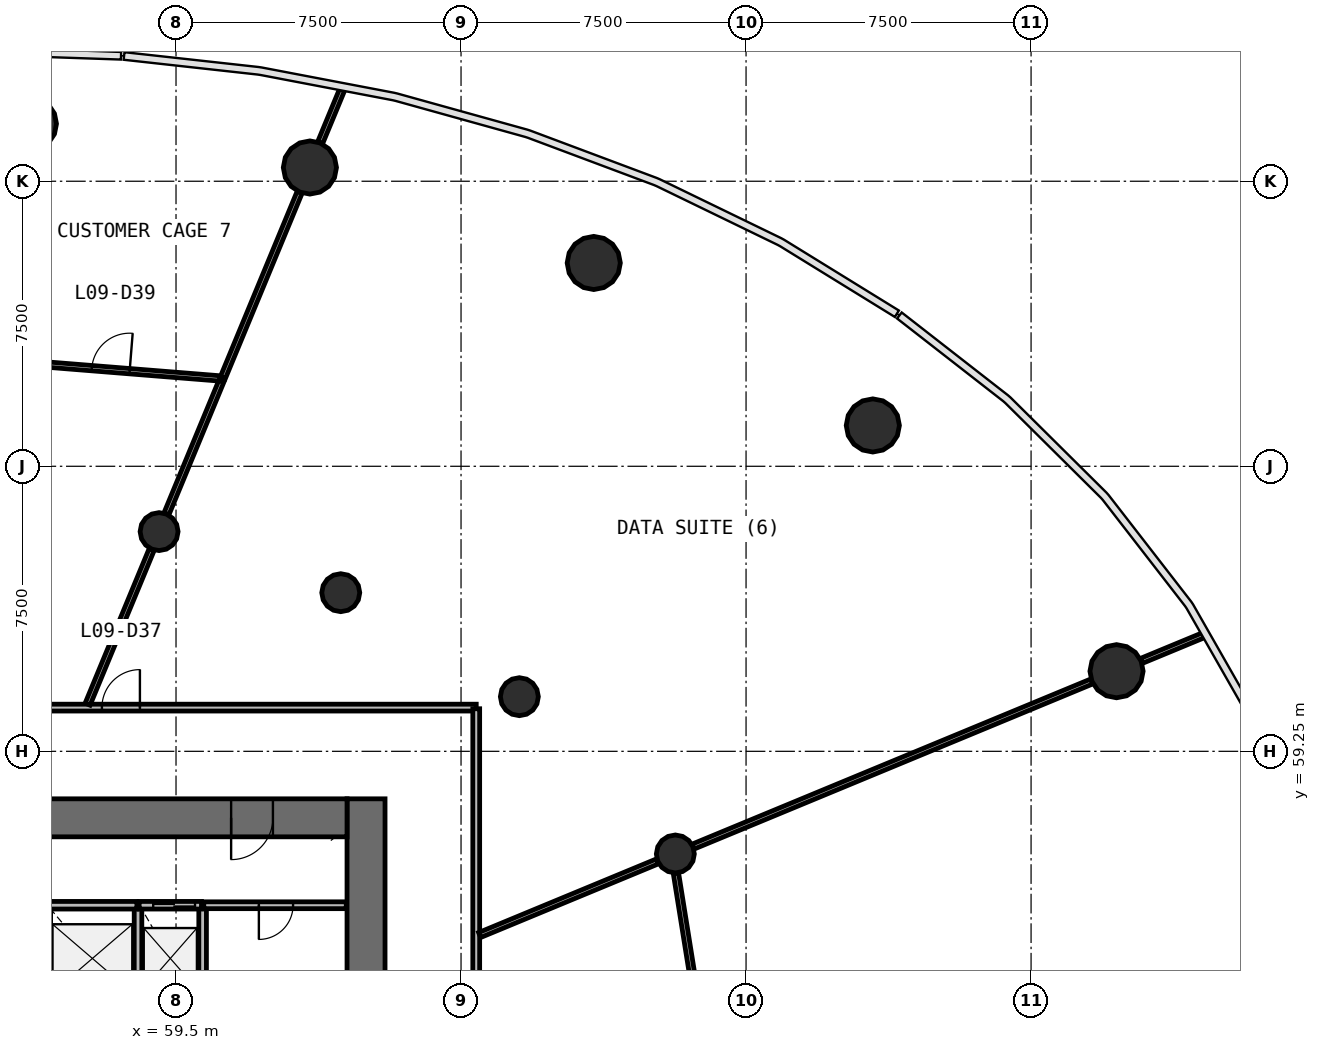
"""IFC4 building model, lengths in metres.
Left out: names, types, materials, properties, quantities, classifications, styles, units other than length and angle.
Written with IfcOpenShell. Run it as: python <this file> out.ifc"""

import sys

from ifc_helpers import new_model, si_unit, direction, frame, frame_2d, origin, origin_2d, place, context, subcontext, project, spatial, rectangle, circle, extrude, source, transform, mapped, element, fill, save


model = new_model("IFC4")
c1 = context("Model", 3, precision=1e-05, world=origin(), true_north=direction((0.0, 1.0)))
c2 = subcontext(c1, "Body", "Model", "MODEL_VIEW")
j1 = project(units=[si_unit("LENGTHUNIT", "METRE"), si_unit("PLANEANGLEUNIT", "RADIAN")], contexts=[c1])
p1 = place(None, origin())
s1 = spatial("IfcSite", under=j1, at=p1, CompositionType="ELEMENT")
p2 = place(p1, origin())
s2 = spatial("IfcBuilding", under=s1, at=p2, CompositionType="ELEMENT")
p3 = place(p2, frame((0.0, 0.0, 40.2)))
s3 = spatial("IfcBuildingStorey", under=s2, at=p3, CompositionType="ELEMENT", Elevation=40.2)
p4 = place(p3, frame((64.5, 38.0, 0.0), z_axis=(0.0, 0.0, 1.0), x_axis=(0.0, 1.0, 0.0)))
e1 = element("IfcWall", 1, at=p4, inside=s3, PredefinedType="SHEAR", context=c2, shape_type="SweptSolid", body=[
    extrude(rectangle(XDim=20.0, YDim=1.0, at=frame_2d((10.0, 0.0))), origin(), (0.0, 0.0, 1.0), 4.4),
])
p5 = place(p4, frame((9.1, 0.0, 0.0)))
e2 = element("IfcOpeningElement", 2, at=p5, cuts=e1, PredefinedType="OPENING", context=c2, shape_type="SweptSolid", body=[
    extrude(rectangle(XDim=1.8, YDim=2.1, at=frame_2d((0.9, 1.05))), frame((0.0, 0.51, 0.0), z_axis=(0.0, -1.0, 0.0), x_axis=(1.0, 0.0, 0.0)), (0.0, 0.0, 1.0), 1.02),
])
p6 = place(p3, frame((64.0, 57.5, 0.0), z_axis=(0.0, 0.0, 1.0), x_axis=(-1.0, 0.0, 0.0)))
e3 = element("IfcWall", 3, at=p6, inside=s3, PredefinedType="SHEAR", context=c2, shape_type="SweptSolid", body=[
    extrude(rectangle(XDim=24.0, YDim=1.0, at=frame_2d((12.0, 0.0))), origin(), (0.0, 0.0, 1.0), 4.4),
])
p7 = place(p6, frame((21.45, 0.0, 0.0)))
e4 = element("IfcOpeningElement", 4, at=p7, cuts=e3, PredefinedType="OPENING", context=c2, shape_type="SweptSolid", body=[
    extrude(rectangle(XDim=1.1, YDim=2.1, at=frame_2d((0.55, 1.05))), frame((0.0, 0.51, 0.0), z_axis=(0.0, -1.0, 0.0), x_axis=(1.0, 0.0, 0.0)), (0.0, 0.0, 1.0), 1.02),
])
p8 = place(p6, frame((1.95, 0.0, 0.0)))
e5 = element("IfcOpeningElement", 5, at=p8, cuts=e3, PredefinedType="OPENING", context=c2, shape_type="SweptSolid", body=[
    extrude(rectangle(XDim=1.1, YDim=2.1, at=frame_2d((0.55, 1.05))), frame((0.0, 0.51, 0.0), z_axis=(0.0, -1.0, 0.0), x_axis=(1.0, 0.0, 0.0)), (0.0, 0.0, 1.0), 1.02),
])
m1 = source(origin(), c2, "Body", "SweptSolid", [
    extrude(circle(Radius=0.7, at=origin_2d()), origin(), (0.0, 0.0, 1.0), 4.4),
])
for number, where, z_axis, x_axis in (
    (6, (84.249, 61.358, 0.0), (0.0, 0.0, 1.0), (1.0, 0.0, 0.0)),
    (7, (77.836, 67.824, 0.0), (0.0, 0.0, 1.0), (1.0, 0.0, 0.0)),
    (8, (70.492, 72.1, 0.0), (0.0, 0.0, 1.0), (1.0, 0.0, 0.0)),
    (9, (63.023, 74.611, 0.0), (0.0, 0.0, 1.0), (1.0, 0.0, 0.0)),
    (10, (55.655, 75.761, 0.0), (0.0, 0.0, 1.0), (1.0, 0.0, 0.0)),
):
    element("IfcColumn", number, at=place(p3, frame(where, z_axis=z_axis, x_axis=x_axis)), inside=s3, PredefinedType="COLUMN", context=c2, shape_type="MappedRepresentation", body=[
        mapped(m1, transform((0.0, 0.0, 0.0), scale=1.0)),
    ])
m2 = source(origin(), c2, "Body", "SweptSolid", [
    extrude(circle(Radius=0.5, at=origin_2d()), origin(), (0.0, 0.0, 1.0), 4.4),
])
for number, where, z_axis, x_axis in (
    (11, (72.639, 56.549, 0.0), (0.0, 0.0, 1.0), (1.0, 0.0, 0.0)),
    (12, (68.535, 60.688, 0.0), (0.0, 0.0, 1.0), (1.0, 0.0, 0.0)),
    (13, (63.835, 63.424, 0.0), (0.0, 0.0, 1.0), (1.0, 0.0, 0.0)),
    (14, (59.055, 65.031, 0.0), (0.0, 0.0, 1.0), (1.0, 0.0, 0.0)),
):
    element("IfcColumn", number, at=place(p3, frame(where, z_axis=z_axis, x_axis=x_axis)), inside=s3, PredefinedType="COLUMN", context=c2, shape_type="MappedRepresentation", body=[
        mapped(m2, transform((0.0, 0.0, 0.0), scale=1.0)),
    ])
for number, where, z_axis, x_axis in (
    (15, (58.5, 52.4, 0.0), (0.0, 0.0, 1.0), (0.0, 1.0, 0.0)),
    (16, (60.2, 52.4, 0.0), (0.0, 0.0, 1.0), (0.0, 1.0, 0.0)),
):
    element("IfcWall", number, at=place(p3, frame(where, z_axis=z_axis, x_axis=x_axis)), inside=s3, PredefinedType="SOLIDWALL", context=c2, shape_type="SweptSolid", body=[
        extrude(rectangle(XDim=2.8, YDim=0.2, at=frame_2d((1.4, 0.0))), origin(), (0.0, 0.0, 1.0), 3.95),
    ])
p9 = place(p3, frame((58.47, 55.2, 0.0), z_axis=(0.0, 0.0, 1.0), x_axis=(-1.0, 0.0, 0.0)))
e17 = element("IfcWall", 17, at=p9, inside=s3, PredefinedType="SOLIDWALL", context=c2, shape_type="SweptSolid", body=[
    extrude(rectangle(XDim=2.34, YDim=0.2, at=frame_2d((1.17, 0.0))), origin(), (0.0, 0.0, 1.0), 3.95),
])
p10 = place(p3, frame((60.17, 55.2, 0.0), z_axis=(0.0, 0.0, 1.0), x_axis=(-1.0, 0.0, 0.0)))
e18 = element("IfcWall", 18, at=p10, inside=s3, PredefinedType="SOLIDWALL", context=c2, shape_type="SweptSolid", body=[
    extrude(rectangle(XDim=1.64, YDim=0.2, at=frame_2d((0.82, 0.0))), origin(), (0.0, 0.0, 1.0), 3.95),
])
p11 = place(p10, frame((0.17, 0.0, 0.0)))
e19 = element("IfcOpeningElement", 19, at=p11, cuts=e18, PredefinedType="OPENING", context=c2, shape_type="SweptSolid", body=[
    extrude(rectangle(XDim=1.1, YDim=2.1, at=frame_2d((0.55, 1.05))), frame((0.0, 0.11, 0.0), z_axis=(0.0, -1.0, 0.0), x_axis=(1.0, 0.0, 0.0)), (0.0, 0.0, 1.0), 0.22),
])
p12 = place(p3, frame((36.6, 60.4, 0.0), z_axis=(0.0, 0.0, 1.0), x_axis=(1.0, 0.0, 0.0)))
e20 = element("IfcWall", 20, at=p12, inside=s3, PredefinedType="PARTITIONING", context=c2, shape_type="SweptSolid", body=[
    extrude(rectangle(XDim=30.8, YDim=0.18, at=frame_2d((15.4, 0.0))), origin(), (0.0, 0.0, 1.0), 3.05),
])
p13 = place(p12, frame((20.95, 0.0, 0.0)))
e21 = element("IfcOpeningElement", 21, at=p13, cuts=e20, PredefinedType="OPENING", context=c2, shape_type="SweptSolid", body=[
    extrude(rectangle(XDim=1.0, YDim=2.1, at=frame_2d((0.5, 1.05))), frame((0.0, 0.1, 0.0), z_axis=(0.0, -1.0, 0.0), x_axis=(1.0, 0.0, 0.0)), (0.0, 0.0, 1.0), 0.2),
])
p14 = place(p12, frame((14.95, 0.0, 0.0)))
e22 = element("IfcOpeningElement", 22, at=p14, cuts=e20, PredefinedType="OPENING", context=c2, shape_type="SweptSolid", body=[
    extrude(rectangle(XDim=1.0, YDim=2.1, at=frame_2d((0.5, 1.05))), frame((0.0, 0.1, 0.0), z_axis=(0.0, -1.0, 0.0), x_axis=(1.0, 0.0, 0.0)), (0.0, 0.0, 1.0), 0.2),
])
p15 = place(p12, frame((8.95, 0.0, 0.0)))
e23 = element("IfcOpeningElement", 23, at=p15, cuts=e20, PredefinedType="OPENING", context=c2, shape_type="SweptSolid", body=[
    extrude(rectangle(XDim=1.0, YDim=2.1, at=frame_2d((0.5, 1.05))), frame((0.0, 0.1, 0.0), z_axis=(0.0, -1.0, 0.0), x_axis=(1.0, 0.0, 0.0)), (0.0, 0.0, 1.0), 0.2),
])
p16 = place(p3, frame((67.4, 60.37, 0.0), z_axis=(0.0, 0.0, 1.0), x_axis=(0.0, -1.0, 0.0)))
e24 = element("IfcWall", 24, at=p16, inside=s3, PredefinedType="PARTITIONING", context=c2, shape_type="SweptSolid", body=[
    extrude(rectangle(XDim=23.583, YDim=0.18, at=frame_2d((11.791, 0.0))), origin(), (0.0, 0.0, 1.0), 3.05),
])
p17 = place(p16, frame((11.333, 0.0, 0.0)))
e25 = element("IfcOpeningElement", 25, at=p17, cuts=e24, PredefinedType="OPENING", context=c2, shape_type="SweptSolid", body=[
    extrude(rectangle(XDim=1.0, YDim=2.1, at=frame_2d((0.5, 1.05))), frame((0.0, 0.1, 0.0), z_axis=(0.0, -1.0, 0.0), x_axis=(1.0, 0.0, 0.0)), (0.0, 0.0, 1.0), 0.2),
])
p18 = place(p3, frame((63.98, 55.2, 0.0), z_axis=(0.0, 0.0, 1.0), x_axis=(-1.0, 0.0, 0.0)))
e26 = element("IfcWall", 26, at=p18, inside=s3, PredefinedType="PARTITIONING", context=c2, shape_type="SweptSolid", body=[
    extrude(rectangle(XDim=3.75, YDim=0.18, at=frame_2d((1.875, 0.0))), origin(), (0.0, 0.0, 1.0), 3.95),
])
p19 = place(p18, frame((1.4, 0.0, 0.0)))
e27 = element("IfcOpeningElement", 27, at=p19, cuts=e26, PredefinedType="OPENING", context=c2, shape_type="SweptSolid", body=[
    extrude(rectangle(XDim=0.9, YDim=2.1, at=frame_2d((0.45, 1.05))), frame((0.0, 0.1, 0.0), z_axis=(0.0, -1.0, 0.0), x_axis=(1.0, 0.0, 0.0)), (0.0, 0.0, 1.0), 0.2),
])
p20 = place(p3, frame((73.106, 56.742, 0.0), z_axis=(0.0, 0.0, 1.0), x_axis=(0.923875075531, 0.382694192291, 0.0)))
e28 = element("IfcWall", 28, at=p20, inside=s3, PredefinedType="PARTITIONING", context=c2, shape_type="SweptSolid", body=[
    extrude(rectangle(XDim=11.356, YDim=0.14, at=frame_2d((5.678, 0.0))), origin(), (0.0, 0.0, 1.0), 3.05),
])
p21 = place(p3, frame((54.834, 69.529, 0.0), z_axis=(0.0, 0.0, 1.0), x_axis=(0.996792896181, -0.080024509517, 0.0)))
e29 = element("IfcWall", 29, at=p21, inside=s3, PredefinedType="PARTITIONING", context=c2, shape_type="SweptSolid", body=[
    extrude(rectangle(XDim=5.906, YDim=0.14, at=frame_2d((2.953, 0.0))), origin(), (0.0, 0.0, 1.0), 3.05),
])
p22 = place(p21, frame((2.456, 0.0, 0.0)))
e30 = element("IfcOpeningElement", 30, at=p22, cuts=e29, PredefinedType="OPENING", context=c2, shape_type="SweptSolid", body=[
    extrude(rectangle(XDim=1.0, YDim=2.1, at=frame_2d((0.5, 1.05))), frame((0.0, 0.08, 0.0), z_axis=(0.0, -1.0, 0.0), x_axis=(1.0, 0.0, 0.0)), (0.0, 0.0, 1.0), 0.16),
])
p23 = place(p3, frame((60.733, 69.084, 0.0), z_axis=(0.0, 0.0, 1.0), x_axis=(0.382663625013, 0.923887736736, 0.0)))
e31 = element("IfcWall", 31, at=p23, inside=s3, PredefinedType="PARTITIONING", context=c2, shape_type="SweptSolid", body=[
    extrude(rectangle(XDim=5.278, YDim=0.14, at=frame_2d((2.639, 0.0))), origin(), (0.0, 0.0, 1.0), 3.05),
])
p24 = place(p3, frame((73.486, 50.859, 0.0), z_axis=(0.0, 0.0, 1.0), x_axis=(-0.158320440448, 0.987387785086, 0.0)))
e32 = element("IfcWall", 32, at=p24, inside=s3, PredefinedType="PARTITIONING", context=c2, shape_type="SweptSolid", body=[
    extrude(rectangle(XDim=5.252, YDim=0.14, at=frame_2d((2.626, 0.0))), origin(), (0.0, 0.0, 1.0), 3.05),
])
p25 = place(p3, frame((67.49, 54.416, 0.0), z_axis=(0.0, 0.0, 1.0), x_axis=(0.923890025086, 0.382658100067, 0.0)))
e33 = element("IfcWall", 33, at=p25, inside=s3, PredefinedType="PARTITIONING", context=c2, shape_type="SweptSolid", body=[
    extrude(rectangle(XDim=5.068, YDim=0.14, at=frame_2d((2.534, 0.0))), origin(), (0.0, 0.0, 1.0), 3.05),
])
p26 = place(p3, frame((57.174, 60.49, 0.0), z_axis=(0.0, 0.0, 1.0), x_axis=(0.382672831764, 0.923883923353, 0.0)))
e34 = element("IfcWall", 34, at=p26, inside=s3, PredefinedType="PARTITIONING", context=c2, shape_type="SweptSolid", body=[
    extrude(rectangle(XDim=4.41, YDim=0.14, at=frame_2d((2.205, 0.0))), origin(), (0.0, 0.0, 1.0), 3.05),
])
p27 = place(p3, frame((59.248, 65.498, 0.0), z_axis=(0.0, 0.0, 1.0), x_axis=(0.382705657047, 0.923870326434, 0.0)))
e35 = element("IfcWall", 35, at=p27, inside=s3, PredefinedType="PARTITIONING", context=c2, shape_type="SweptSolid", body=[
    extrude(rectangle(XDim=3.778, YDim=0.14, at=frame_2d((1.889, 0.0))), origin(), (0.0, 0.0, 1.0), 3.05),
])
p28 = place(p3, frame((84.9, 61.628, 0.0), z_axis=(0.0, 0.0, 1.0), x_axis=(0.92390604877, 0.382619410179, 0.0)))
e36 = element("IfcWall", 36, at=p28, inside=s3, PredefinedType="PARTITIONING", context=c2, shape_type="SweptSolid", body=[
    extrude(rectangle(XDim=1.772, YDim=0.14, at=frame_2d((0.886, 0.0))), origin(), (0.0, 0.0, 1.0), 3.05),
])
p29 = place(p3, frame((63.292, 75.263, 0.0), z_axis=(0.0, 0.0, 1.0), x_axis=(0.382746232653, 0.92385351728, 0.0)))
e37 = element("IfcWall", 37, at=p29, inside=s3, PredefinedType="PARTITIONING", context=c2, shape_type="SweptSolid", body=[
    extrude(rectangle(XDim=1.512, YDim=0.14, at=frame_2d((0.756, 0.0))), origin(), (0.0, 0.0, 1.0), 3.05),
])
m3 = source(origin(), c2, "Body", "SweptSolid", [
    extrude(rectangle(XDim=1.1, YDim=2.1, at=frame_2d((0.55, 1.05))), frame((0.0, 0.025, 0.0), z_axis=(0.0, -1.0, 0.0), x_axis=(1.0, 0.0, 0.0)), (0.0, 0.0, 1.0), 0.05),
])
p30 = place(p11, origin())
e38 = element("IfcDoor", 38, at=p30, inside=s3, OperationType="DOUBLE_DOOR_SLIDING", PredefinedType="USERDEFINED", context=c2, shape_type="MappedRepresentation", body=[
    mapped(m3, transform((0.0, 0.0, 0.0), scale=1.0)),
])
fill(e19, e38)
m4 = source(origin(), c2, "Body", "SweptSolid", [
    extrude(rectangle(XDim=1.1, YDim=2.1, at=frame_2d((0.55, 1.05))), frame((0.0, 0.025, 0.0), z_axis=(0.0, -1.0, 0.0), x_axis=(1.0, 0.0, 0.0)), (0.0, 0.0, 1.0), 0.05),
])
p31 = place(p8, origin())
e39 = element("IfcDoor", 39, at=p31, inside=s3, OperationType="SINGLE_SWING_RIGHT", PredefinedType="DOOR", context=c2, shape_type="MappedRepresentation", body=[
    mapped(m4, transform((0.0, 0.0, 0.0), scale=1.0)),
])
fill(e5, e39)
m5 = source(origin(), c2, "Body", "SweptSolid", [
    extrude(rectangle(XDim=1.0, YDim=2.1, at=frame_2d((0.5, 1.05))), frame((0.0, 0.025, 0.0), z_axis=(0.0, -1.0, 0.0), x_axis=(1.0, 0.0, 0.0)), (0.0, 0.0, 1.0), 0.05),
])
p32 = place(p13, origin())
e40 = element("IfcDoor", 40, at=p32, inside=s3, OperationType="SINGLE_SWING_RIGHT", PredefinedType="DOOR", context=c2, shape_type="MappedRepresentation", body=[
    mapped(m5, transform((0.0, 0.0, 0.0), scale=1.0)),
])
fill(e21, e40)
p33 = place(p22, origin())
e41 = element("IfcDoor", 41, at=p33, inside=s3, OperationType="SINGLE_SWING_RIGHT", PredefinedType="DOOR", context=c2, shape_type="MappedRepresentation", body=[
    mapped(m5, transform((0.0, 0.0, 0.0), scale=1.0)),
])
fill(e30, e41)
m6 = source(origin(), c2, "Body", "SweptSolid", [
    extrude(rectangle(XDim=0.9, YDim=2.1, at=frame_2d((0.45, 1.05))), frame((0.0, 0.025, 0.0), z_axis=(0.0, -1.0, 0.0), x_axis=(1.0, 0.0, 0.0)), (0.0, 0.0, 1.0), 0.05),
])
p34 = place(p19, origin())
e42 = element("IfcDoor", 42, at=p34, inside=s3, OperationType="SINGLE_SWING_RIGHT", PredefinedType="DOOR", context=c2, shape_type="MappedRepresentation", body=[
    mapped(m6, transform((0.0, 0.0, 0.0), scale=1.0)),
])
fill(e27, e42)
save(model, sys.argv[1])
